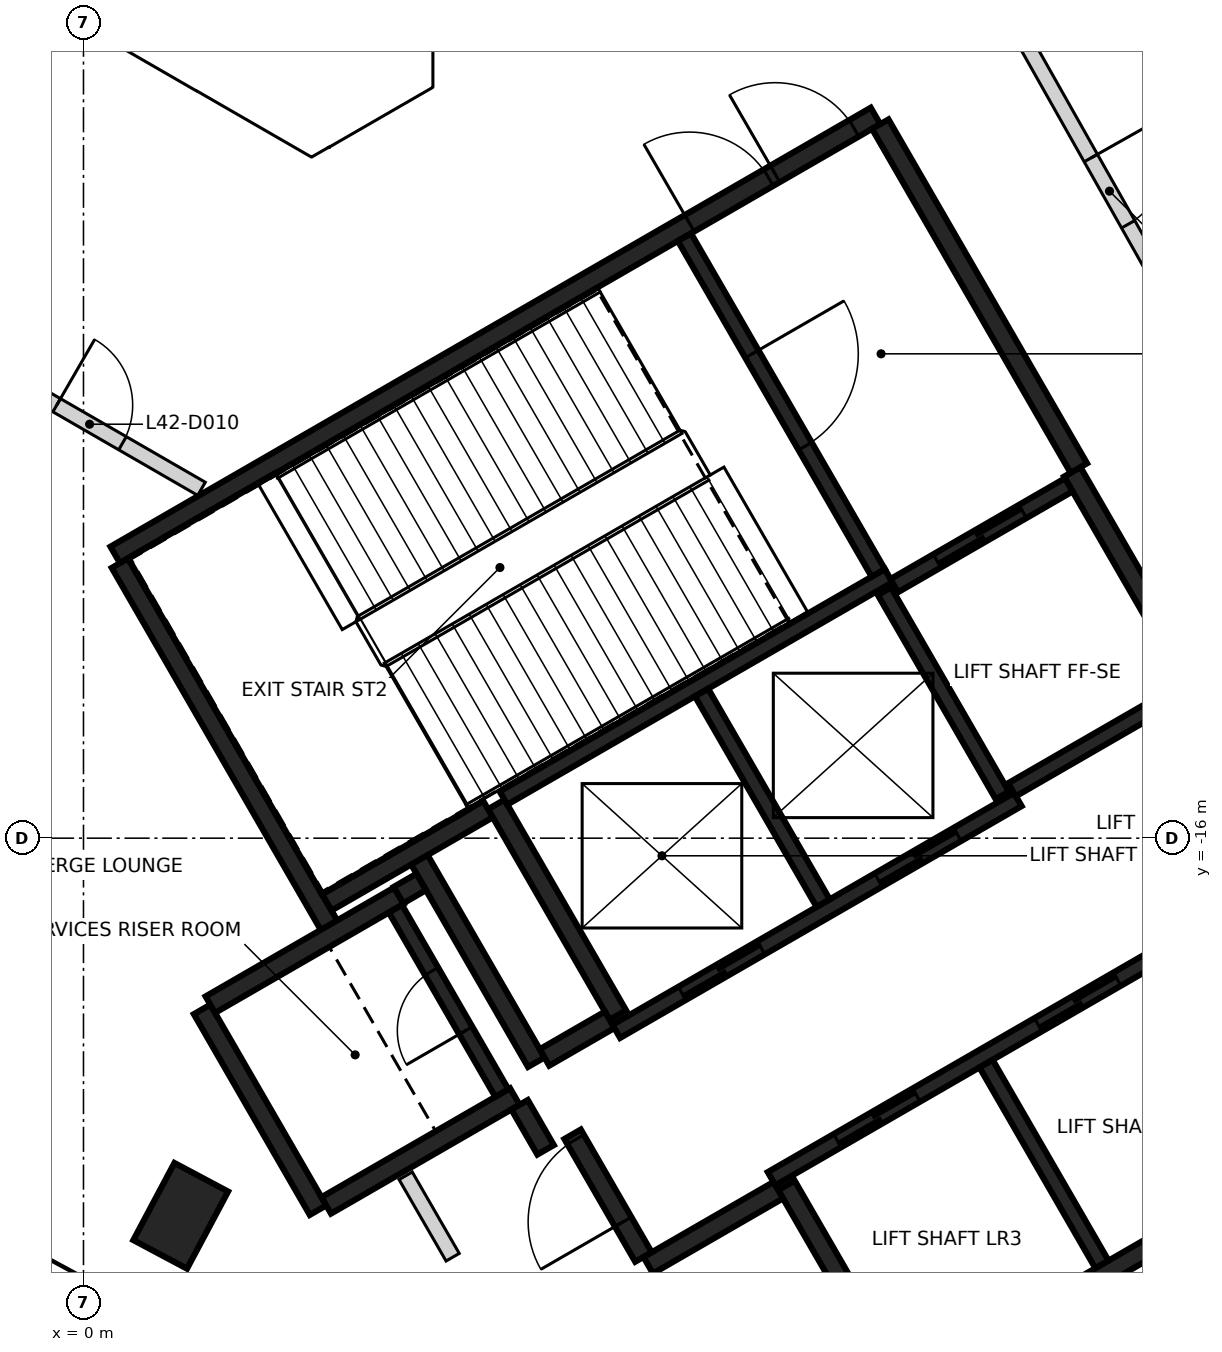
"""IFC4 building model, lengths in metres.
Left out: names, types, materials, properties, quantities, classifications, styles, units other than length and angle.
Written with IfcOpenShell. Run it as: python <this file> out.ifc"""

import sys

from ifc_helpers import new_model, si_unit, direction, frame, frame_2d, origin, origin_2d, place, context, subcontext, project, spatial, rectangle, extrude, element, fill, save


model = new_model("IFC4")
c1 = context("Model", 3, precision=1e-05, world=origin(), true_north=direction((0.0, 1.0)))
c2 = subcontext(c1, "Body", "Model", "MODEL_VIEW")
j1 = project(units=[si_unit("LENGTHUNIT", "METRE"), si_unit("PLANEANGLEUNIT", "RADIAN")], contexts=[c1])
p1 = place(None, origin())
s1 = spatial("IfcSite", under=j1, at=p1, CompositionType="ELEMENT")
p2 = place(p1, origin())
s2 = spatial("IfcBuilding", under=s1, at=p2, CompositionType="ELEMENT")
p3 = place(p2, frame((0.0, 0.0, 169.6)))
s3 = spatial("IfcBuildingStorey", under=s2, at=p3, CompositionType="ELEMENT", Elevation=169.6)
p4 = place(p3, frame((1.279, -20.968, -0.35), z_axis=(0.0, 0.0, 1.0), x_axis=(0.470001593924, 0.882665566174, 0.0)))
e1 = element("IfcColumn", 1, at=p4, inside=s3, PredefinedType="COLUMN", context=c2, shape_type="SweptSolid", body=[
    extrude(rectangle(XDim=1.15, YDim=0.8, at=origin_2d()), origin(), (0.0, 0.0, 1.0), 6.0),
])
p5 = place(p3, frame((0.417, -12.273, 0.0), z_axis=(0.0, 0.0, 1.0), x_axis=(0.866021906294, 0.500006057782, 0.0)))
e2 = element("IfcWall", 2, at=p5, inside=s3, PredefinedType="SHEAR", context=c2, shape_type="SweptSolid", body=[
    extrude(rectangle(XDim=11.55, YDim=0.25, at=frame_2d((5.775, 0.0))), origin(), (0.0, 0.0, 1.0), 5.65),
])
p6 = place(p5, frame((10.025, 0.0, 0.0)))
e3 = element("IfcOpeningElement", 3, at=p6, cuts=e2, PredefinedType="OPENING", context=c2, shape_type="SweptSolid", body=[
    extrude(rectangle(XDim=1.2, YDim=2.1, at=frame_2d((0.6, 1.05))), frame((0.0, 0.135, 0.0), z_axis=(0.0, -1.0, 0.0), x_axis=(1.0, 0.0, 0.0)), (0.0, 0.0, 1.0), 0.27),
])
p7 = place(p5, frame((8.725, 0.0, 0.0)))
e4 = element("IfcOpeningElement", 4, at=p7, cuts=e2, PredefinedType="OPENING", context=c2, shape_type="SweptSolid", body=[
    extrude(rectangle(XDim=1.2, YDim=2.1, at=frame_2d((0.6, 1.05))), frame((0.0, 0.135, 0.0), z_axis=(0.0, -1.0, 0.0), x_axis=(1.0, 0.0, 0.0)), (0.0, 0.0, 1.0), 0.27),
])
p8 = place(p3, frame((13.008, -11.181, 0.0), z_axis=(0.0, 0.0, 1.0), x_axis=(0.500004234368, -0.866022959057, 0.0)))
e5 = element("IfcWall", 5, at=p8, inside=s3, PredefinedType="SHEAR", context=c2, shape_type="SweptSolid", body=[
    extrude(rectangle(XDim=6.25, YDim=0.25, at=frame_2d((3.125, 0.0))), origin(), (0.0, 0.0, 1.0), 5.65),
])
p9 = place(p3, frame((15.865, -20.328, 0.0), z_axis=(0.0, 0.0, 1.0), x_axis=(-0.86602852612, -0.499994591916, 0.0)))
e6 = element("IfcWall", 6, at=p9, inside=s3, PredefinedType="SHEAR", context=c2, shape_type="SweptSolid", body=[
    extrude(rectangle(XDim=5.85, YDim=0.25, at=frame_2d((2.925, 0.0))), origin(), (0.0, 0.0, 1.0), 5.65),
])
p10 = place(p3, frame((3.235, -17.153, 0.0), z_axis=(0.0, 0.0, 1.0), x_axis=(-0.500008851346, 0.866020293397, 0.0)))
e7 = element("IfcWall", 7, at=p10, inside=s3, PredefinedType="SHEAR", context=c2, shape_type="SweptSolid", body=[
    extrude(rectangle(XDim=5.51, YDim=0.25, at=frame_2d((2.755, 0.0))), origin(), (0.0, 0.0, 1.0), 5.65),
])
p11 = place(p3, frame((10.483, -6.606, 0.0), z_axis=(0.0, 0.0, 1.0), x_axis=(0.49999885962, -0.866026062182, 0.0)))
e8 = element("IfcWall", 8, at=p11, inside=s3, PredefinedType="SHEAR", context=c2, shape_type="SweptSolid", body=[
    extrude(rectangle(XDim=5.225, YDim=0.25, at=frame_2d((2.612, 0.0))), origin(), (0.0, 0.0, 1.0), 5.65),
])
p12 = place(p3, frame((7.031, -18.327, 0.0), z_axis=(0.0, 0.0, 1.0), x_axis=(-0.499971222258, 0.866042017984, 0.0)))
e9 = element("IfcWall", 9, at=p12, inside=s3, PredefinedType="SHEAR", context=c2, shape_type="SweptSolid", body=[
    extrude(rectangle(XDim=3.2, YDim=0.25, at=frame_2d((1.6, 0.0))), origin(), (0.0, 0.0, 1.0), 5.65),
])
p13 = place(p3, frame((10.736, -23.145, 0.0), z_axis=(0.0, 0.0, 1.0), x_axis=(-0.500023226632, 0.866011993467, 0.0)))
e10 = element("IfcWall", 10, at=p13, inside=s3, PredefinedType="SHEAR", context=c2, shape_type="SweptSolid", body=[
    extrude(rectangle(XDim=2.974, YDim=0.25, at=frame_2d((1.487, 0.0))), origin(), (0.0, 0.0, 1.0), 5.65),
])
p14 = place(p3, frame((3.085, -20.894, 0.0), z_axis=(0.0, 0.0, 1.0), x_axis=(-0.499978833458, 0.866037623948, 0.0)))
e11 = element("IfcWall", 11, at=p14, inside=s3, PredefinedType="SHEAR", context=c2, shape_type="SweptSolid", body=[
    extrude(rectangle(XDim=3.05, YDim=0.25, at=frame_2d((1.525, 0.0))), origin(), (0.0, 0.0, 1.0), 5.65),
])
p15 = place(p3, frame((1.669, -18.19, 0.0), z_axis=(0.0, 0.0, 1.0), x_axis=(0.866042235819, 0.499970844928, 0.0)))
e12 = element("IfcWall", 12, at=p15, inside=s3, PredefinedType="SHEAR", context=c2, shape_type="SweptSolid", body=[
    extrude(rectangle(XDim=2.865, YDim=0.25, at=frame_2d((1.432, 0.0))), origin(), (0.0, 0.0, 1.0), 5.65),
])
p16 = place(p3, frame((5.675, -19.399, 0.0), z_axis=(0.0, 0.0, 1.0), x_axis=(-0.866026637627, -0.499997862916, 0.0)))
e13 = element("IfcWall", 13, at=p16, inside=s3, PredefinedType="SHEAR", context=c2, shape_type="SweptSolid", body=[
    extrude(rectangle(XDim=2.865, YDim=0.25, at=frame_2d((1.432, 0.0))), origin(), (0.0, 0.0, 1.0), 5.65),
])
p17 = place(p3, frame((4.414, -16.276, 0.0), z_axis=(0.0, 0.0, 1.0), x_axis=(0.500003324108, -0.866023484601, 0.0)))
e14 = element("IfcWall", 14, at=p17, inside=s3, PredefinedType="SHEAR", context=c2, shape_type="SweptSolid", body=[
    extrude(rectangle(XDim=3.085, YDim=0.25, at=frame_2d((1.542, 0.0))), origin(), (0.0, 0.0, 1.0), 5.65),
])
p18 = place(p3, frame((5.322, -15.619, 0.0), z_axis=(0.0, 0.0, 1.0), x_axis=(-0.866026229868, -0.499998569178, 0.0)))
e15 = element("IfcWall", 15, at=p18, inside=s3, PredefinedType="SHEAR", context=c2, shape_type="SweptSolid", body=[
    extrude(rectangle(XDim=2.449, YDim=0.25, at=frame_2d((1.225, 0.0))), origin(), (0.0, 0.0, 1.0), 5.65),
])
p19 = place(p3, frame((9.14, -20.631, 0.0), z_axis=(0.0, 0.0, 1.0), x_axis=(-0.866043531843, -0.499968599967, 0.0)))
e16 = element("IfcWall", 16, at=p19, inside=s3, PredefinedType="SHEAR", context=c2, shape_type="SweptSolid", body=[
    extrude(rectangle(XDim=1.975, YDim=0.25, at=frame_2d((0.987, 0.0))), origin(), (0.0, 0.0, 1.0), 5.65),
])
p20 = place(p3, frame((7.367, -21.51, 0.0), z_axis=(0.0, 0.0, 1.0), x_axis=(-0.499983108224, 0.866035156036, 0.0)))
e17 = element("IfcWall", 17, at=p20, inside=s3, PredefinedType="SHEAR", context=c2, shape_type="SweptSolid", body=[
    extrude(rectangle(XDim=1.865, YDim=0.25, at=frame_2d((0.932, 0.0))), origin(), (0.0, 0.0, 1.0), 5.65),
])
p21 = place(p20, frame((0.535, 0.0, 0.0)))
e18 = element("IfcOpeningElement", 18, at=p21, cuts=e17, PredefinedType="OPENING", context=c2, shape_type="SweptSolid", body=[
    extrude(rectangle(XDim=1.25, YDim=2.1, at=frame_2d((0.625, 1.05))), frame((0.0, 0.135, 0.0), z_axis=(0.0, -1.0, 0.0), x_axis=(1.0, 0.0, 0.0)), (0.0, 0.0, 1.0), 0.27),
])
p22 = place(p3, frame((6.065, -18.885, 0.0), z_axis=(0.0, 0.0, 1.0), x_axis=(0.866017078145, 0.500014420154, 0.0)))
e19 = element("IfcWall", 19, at=p22, inside=s3, PredefinedType="SHEAR", context=c2, shape_type="SweptSolid", body=[
    extrude(rectangle(XDim=0.989, YDim=0.25, at=frame_2d((0.495, 0.0))), origin(), (0.0, 0.0, 1.0), 5.65),
])
p23 = place(p3, frame((6.08, -20.1, 0.0), z_axis=(0.0, 0.0, 1.0), x_axis=(-0.500051773299, 0.865995510393, 0.0)))
e20 = element("IfcWall", 20, at=p23, inside=s3, PredefinedType="SHEAR", context=c2, shape_type="SweptSolid", body=[
    extrude(rectangle(XDim=0.685, YDim=0.25, at=frame_2d((0.342, 0.0))), origin(), (0.0, 0.0, 1.0), 5.65),
])
p24 = place(p3, frame((4.145, -16.749, 0.0), z_axis=(0.0, 0.0, 1.0), x_axis=(0.866185586049, 0.49972245349, 0.0)))
e21 = element("IfcWall", 21, at=p24, inside=s3, PredefinedType="SHEAR", context=c2, shape_type="SweptSolid", body=[
    extrude(rectangle(XDim=0.344, YDim=0.25, at=frame_2d((0.172, 0.0))), origin(), (0.0, 0.0, 1.0), 5.65),
])
p25 = place(p3, frame((9.052, -20.48, 0.0), z_axis=(0.0, 0.0, 1.0), x_axis=(0.866030299012, 0.499991521122, 0.0)))
e22 = element("IfcWall", 22, at=p25, inside=s3, PredefinedType="SHEAR", context=c2, shape_type="SweptSolid", body=[
    extrude(rectangle(XDim=6.1, YDim=0.2, at=frame_2d((3.05, 0.0))), origin(), (0.0, 0.0, 1.0), 5.65),
])
p26 = place(p25, frame((1.0, 0.0, 0.0)))
e23 = element("IfcOpeningElement", 23, at=p26, cuts=e22, PredefinedType="OPENING", context=c2, shape_type="SweptSolid", body=[
    extrude(rectangle(XDim=1.2, YDim=2.1, at=frame_2d((0.6, 1.05))), frame((0.0, 0.11, 0.0), z_axis=(0.0, -1.0, 0.0), x_axis=(1.0, 0.0, 0.0)), (0.0, 0.0, 1.0), 0.22),
])
p27 = place(p25, frame((4.05, 0.0, 0.0)))
e24 = element("IfcOpeningElement", 24, at=p27, cuts=e22, PredefinedType="OPENING", context=c2, shape_type="SweptSolid", body=[
    extrude(rectangle(XDim=1.2, YDim=2.1, at=frame_2d((0.6, 1.05))), frame((0.0, 0.11, 0.0), z_axis=(0.0, -1.0, 0.0), x_axis=(1.0, 0.0, 0.0)), (0.0, 0.0, 1.0), 0.22),
])
p28 = place(p3, frame((5.526, -15.472, 0.0), z_axis=(0.0, 0.0, 1.0), x_axis=(0.866041752167, 0.499971682701, 0.0)))
e25 = element("IfcWall", 25, at=p28, inside=s3, PredefinedType="SHEAR", context=c2, shape_type="SweptSolid", body=[
    extrude(rectangle(XDim=5.851, YDim=0.2, at=frame_2d((2.925, 0.0))), origin(), (0.0, 0.0, 1.0), 5.65),
])
p29 = place(p3, frame((12.293, -15.491, 0.0), z_axis=(0.0, 0.0, 1.0), x_axis=(-0.866030299012, -0.499991521122, 0.0)))
e26 = element("IfcWall", 26, at=p29, inside=s3, PredefinedType="SHEAR", context=c2, shape_type="SweptSolid", body=[
    extrude(rectangle(XDim=6.1, YDim=0.2, at=frame_2d((3.05, 0.0))), origin(), (0.0, 0.0, 1.0), 5.65),
])
p30 = place(p29, frame((3.9, 0.0, 0.0)))
e27 = element("IfcOpeningElement", 27, at=p30, cuts=e26, PredefinedType="OPENING", context=c2, shape_type="SweptSolid", body=[
    extrude(rectangle(XDim=1.2, YDim=2.1, at=frame_2d((0.6, 1.05))), frame((0.0, 0.11, 0.0), z_axis=(0.0, -1.0, 0.0), x_axis=(1.0, 0.0, 0.0)), (0.0, 0.0, 1.0), 0.22),
])
p31 = place(p29, frame((0.918, 0.0, 0.0)))
e28 = element("IfcOpeningElement", 28, at=p31, cuts=e26, PredefinedType="OPENING", context=c2, shape_type="SweptSolid", body=[
    extrude(rectangle(XDim=1.2, YDim=2.1, at=frame_2d((0.6, 1.05))), frame((0.0, 0.11, 0.0), z_axis=(0.0, -1.0, 0.0), x_axis=(1.0, 0.0, 0.0)), (0.0, 0.0, 1.0), 0.22),
])
p32 = place(p3, frame((7.906, -8.094, 0.0), z_axis=(0.0, 0.0, 1.0), x_axis=(0.500027839223, -0.866009330205, 0.0)))
e29 = element("IfcWall", 29, at=p32, inside=s3, PredefinedType="SHEAR", context=c2, shape_type="SweptSolid", body=[
    extrude(rectangle(XDim=5.098, YDim=0.2, at=frame_2d((2.549, 0.0))), origin(), (0.0, 0.0, 1.0), 5.65),
])
p33 = place(p32, frame((1.774, 0.0, 0.0)))
e30 = element("IfcOpeningElement", 30, at=p33, cuts=e29, PredefinedType="OPENING", context=c2, shape_type="SweptSolid", body=[
    extrude(rectangle(XDim=1.4, YDim=2.1, at=frame_2d((0.7, 1.05))), frame((0.0, 0.11, 0.0), z_axis=(0.0, -1.0, 0.0), x_axis=(1.0, 0.0, 0.0)), (0.0, 0.0, 1.0), 0.22),
])
p34 = place(p3, frame((8.132, -14.084, 0.0), z_axis=(0.0, 0.0, 1.0), x_axis=(0.499997778408, -0.866026686418, 0.0)))
e31 = element("IfcWall", 31, at=p34, inside=s3, PredefinedType="SHEAR", context=c2, shape_type="SweptSolid", body=[
    extrude(rectangle(XDim=3.198, YDim=0.2, at=frame_2d((1.599, 0.0))), origin(), (0.0, 0.0, 1.0), 5.65),
])
p35 = place(p3, frame((11.875, -18.967, 0.0), z_axis=(0.0, 0.0, 1.0), x_axis=(0.49998131003, -0.866036194175, 0.0)))
e32 = element("IfcWall", 32, at=p35, inside=s3, PredefinedType="SHEAR", context=c2, shape_type="SweptSolid", body=[
    extrude(rectangle(XDim=3.048, YDim=0.2, at=frame_2d((1.524, 0.0))), origin(), (0.0, 0.0, 1.0), 5.65),
])
p36 = place(p3, frame((5.503, -19.352, 0.0), z_axis=(0.0, 0.0, 1.0), x_axis=(-0.499986818241, 0.866033014143, 0.0)))
e33 = element("IfcWall", 33, at=p36, inside=s3, PredefinedType="SHEAR", context=c2, shape_type="SweptSolid", body=[
    extrude(rectangle(XDim=2.798, YDim=0.2, at=frame_2d((1.399, 0.0))), origin(), (0.0, 0.0, 1.0), 5.65),
])
p37 = place(p36, frame((0.949, 0.0, 0.0)))
e34 = element("IfcOpeningElement", 34, at=p37, cuts=e33, PredefinedType="OPENING", context=c2, shape_type="SweptSolid", body=[
    extrude(rectangle(XDim=0.9, YDim=2.1, at=frame_2d((0.45, 1.05))), frame((0.0, 0.11, 0.0), z_axis=(0.0, -1.0, 0.0), x_axis=(1.0, 0.0, 0.0)), (0.0, 0.0, 1.0), 0.22),
])
p38 = place(p3, frame((12.088, -15.437, 0.0), z_axis=(0.0, 0.0, 1.0), x_axis=(-0.500026960575, 0.86600983753, 0.0)))
e35 = element("IfcWall", 35, at=p38, inside=s3, PredefinedType="SHEAR", context=c2, shape_type="SweptSolid", body=[
    extrude(rectangle(XDim=3.1, YDim=0.2, at=frame_2d((1.55, 0.0))), origin(), (0.0, 0.0, 1.0), 5.65),
])
p39 = place(p3, frame((10.666, -12.678, 0.0), z_axis=(0.0, 0.0, 1.0), x_axis=(0.866018407898, 0.500012117035, 0.0)))
e36 = element("IfcWall", 36, at=p39, inside=s3, PredefinedType="SHEAR", context=c2, shape_type="SweptSolid", body=[
    extrude(rectangle(XDim=2.651, YDim=0.2, at=frame_2d((1.325, 0.0))), origin(), (0.0, 0.0, 1.0), 5.65),
])
p40 = place(p39, frame((0.652, 0.0, 0.0)))
e37 = element("IfcOpeningElement", 37, at=p40, cuts=e36, PredefinedType="OPENING", context=c2, shape_type="SweptSolid", body=[
    extrude(rectangle(XDim=1.3, YDim=2.1, at=frame_2d((0.65, 1.05))), frame((0.0, 0.11, 0.0), z_axis=(0.0, -1.0, 0.0), x_axis=(1.0, 0.0, 0.0)), (0.0, 0.0, 1.0), 0.22),
])
p41 = place(p3, frame((14.512, -14.037, 0.0), z_axis=(0.0, 0.0, 1.0), x_axis=(-0.866018407898, -0.500012117035, 0.0)))
e38 = element("IfcWall", 38, at=p41, inside=s3, PredefinedType="SHEAR", context=c2, shape_type="SweptSolid", body=[
    extrude(rectangle(XDim=2.651, YDim=0.2, at=frame_2d((1.325, 0.0))), origin(), (0.0, 0.0, 1.0), 5.65),
])
p42 = place(p3, frame((-8.337, -5.695, 0.0), z_axis=(0.0, 0.0, 1.0), x_axis=(0.86605990967, -0.499940229289, 0.0)))
e39 = element("IfcWall", 39, at=p42, inside=s3, PredefinedType="PARTITIONING", context=c2, shape_type="SweptSolid", body=[
    extrude(rectangle(XDim=11.419, YDim=0.2, at=frame_2d((5.709, 0.0))), origin(), (0.0, 0.0, 1.0), 5.65),
])
p43 = place(p42, frame((2.987, 0.0, 0.0)))
e40 = element("IfcOpeningElement", 40, at=p43, cuts=e39, PredefinedType="OPENING", context=c2, shape_type="SweptSolid", body=[
    extrude(rectangle(XDim=2.0, YDim=2.1, at=frame_2d((1.0, 1.05))), frame((0.0, 0.11, 0.0), z_axis=(0.0, -1.0, 0.0), x_axis=(1.0, 0.0, 0.0)), (0.0, 0.0, 1.0), 0.22),
])
p44 = place(p42, frame((9.219, 0.0, 0.0)))
e41 = element("IfcOpeningElement", 41, at=p44, cuts=e39, PredefinedType="OPENING", context=c2, shape_type="SweptSolid", body=[
    extrude(rectangle(XDim=1.0, YDim=2.1, at=frame_2d((0.5, 1.05))), frame((0.0, 0.11, 0.0), z_axis=(0.0, -1.0, 0.0), x_axis=(1.0, 0.0, 0.0)), (0.0, 0.0, 1.0), 0.22),
])
p45 = place(p3, frame((4.239, -20.442, 0.0), z_axis=(0.0, 0.0, 1.0), x_axis=(0.499790804427, -0.866146149221, 0.0)))
e42 = element("IfcWall", 42, at=p45, inside=s3, PredefinedType="PARTITIONING", context=c2, shape_type="SweptSolid", body=[
    extrude(rectangle(XDim=1.237, YDim=0.2, at=frame_2d((0.618, 0.0))), origin(), (0.0, 0.0, 1.0), 5.65),
])
p46 = place(p3, frame((12.187, -5.164, 0.0), z_axis=(0.0, 0.0, 1.0), x_axis=(0.491323462206, -0.870977184251, 0.0)))
e43 = element("IfcWall", 43, at=p46, inside=s3, PredefinedType="PARTITIONING", context=c2, shape_type="SweptSolid", body=[
    extrude(rectangle(XDim=12.523, YDim=0.2, at=frame_2d((6.261, 0.0))), origin(), (0.0, 0.0, 1.0), 4.75),
])
p47 = place(p46, frame((9.546, 0.0, 0.0)))
e44 = element("IfcOpeningElement", 44, at=p47, cuts=e43, PredefinedType="OPENING", context=c2, shape_type="SweptSolid", body=[
    extrude(rectangle(XDim=0.9, YDim=2.1, at=frame_2d((0.45, 1.05))), frame((0.0, 0.11, 0.0), z_axis=(0.0, -1.0, 0.0), x_axis=(1.0, 0.0, 0.0)), (0.0, 0.0, 1.0), 0.22),
])
p48 = place(p46, frame((2.168, 0.0, 0.0)))
e45 = element("IfcOpeningElement", 45, at=p48, cuts=e43, PredefinedType="OPENING", context=c2, shape_type="SweptSolid", body=[
    extrude(rectangle(XDim=1.0, YDim=2.1, at=frame_2d((0.5, 1.05))), frame((0.0, 0.11, 0.0), z_axis=(0.0, -1.0, 0.0), x_axis=(1.0, 0.0, 0.0)), (0.0, 0.0, 1.0), 0.22),
])
p49 = place(p40, origin())
e46 = element("IfcDoor", 46, at=p49, inside=s3, OperationType="SLIDING_TO_RIGHT", PredefinedType="DOOR", context=c2, shape_type="SweptSolid", body=[
    extrude(rectangle(XDim=1.3, YDim=2.1, at=frame_2d((0.65, 1.05))), frame((0.0, 0.025, 0.0), z_axis=(0.0, -1.0, 0.0), x_axis=(1.0, 0.0, 0.0)), (0.0, 0.0, 1.0), 0.05),
])
fill(e37, e46)
p50 = place(p30, origin())
e47 = element("IfcDoor", 47, at=p50, inside=s3, OperationType="DOUBLE_DOOR_SLIDING", PredefinedType="DOOR", context=c2, shape_type="SweptSolid", body=[
    extrude(rectangle(XDim=1.2, YDim=2.1, at=frame_2d((0.6, 1.05))), frame((0.0, 0.025, 0.0), z_axis=(0.0, -1.0, 0.0), x_axis=(1.0, 0.0, 0.0)), (0.0, 0.0, 1.0), 0.05),
])
fill(e27, e47)
p51 = place(p31, origin())
e48 = element("IfcDoor", 48, at=p51, inside=s3, OperationType="DOUBLE_DOOR_SLIDING", PredefinedType="DOOR", context=c2, shape_type="SweptSolid", body=[
    extrude(rectangle(XDim=1.2, YDim=2.1, at=frame_2d((0.6, 1.05))), frame((0.0, 0.025, 0.0), z_axis=(0.0, -1.0, 0.0), x_axis=(1.0, 0.0, 0.0)), (0.0, 0.0, 1.0), 0.05),
])
fill(e28, e48)
p52 = place(p26, origin())
e49 = element("IfcDoor", 49, at=p52, inside=s3, OperationType="DOUBLE_DOOR_SLIDING", PredefinedType="DOOR", context=c2, shape_type="SweptSolid", body=[
    extrude(rectangle(XDim=1.2, YDim=2.1, at=frame_2d((0.6, 1.05))), frame((0.0, 0.025, 0.0), z_axis=(0.0, -1.0, 0.0), x_axis=(1.0, 0.0, 0.0)), (0.0, 0.0, 1.0), 0.05),
])
fill(e23, e49)
p53 = place(p27, origin())
e50 = element("IfcDoor", 50, at=p53, inside=s3, OperationType="DOUBLE_DOOR_SLIDING", PredefinedType="DOOR", context=c2, shape_type="SweptSolid", body=[
    extrude(rectangle(XDim=1.2, YDim=2.1, at=frame_2d((0.6, 1.05))), frame((0.0, 0.025, 0.0), z_axis=(0.0, -1.0, 0.0), x_axis=(1.0, 0.0, 0.0)), (0.0, 0.0, 1.0), 0.05),
])
fill(e24, e50)
p54 = place(p21, origin())
e51 = element("IfcDoor", 51, at=p54, inside=s3, OperationType="SINGLE_SWING_LEFT", PredefinedType="DOOR", context=c2, shape_type="SweptSolid", body=[
    extrude(rectangle(XDim=1.25, YDim=2.1, at=frame_2d((0.625, 1.05))), frame((0.0, 0.025, 0.0), z_axis=(0.0, -1.0, 0.0), x_axis=(1.0, 0.0, 0.0)), (0.0, 0.0, 1.0), 0.05),
])
fill(e18, e51)
p55 = place(p6, origin())
e52 = element("IfcDoor", 52, at=p55, inside=s3, OperationType="SINGLE_SWING_LEFT", PredefinedType="DOOR", context=c2, shape_type="SweptSolid", body=[
    extrude(rectangle(XDim=1.2, YDim=2.1, at=frame_2d((0.6, 1.05))), frame((0.0, 0.025, 0.0), z_axis=(0.0, -1.0, 0.0), x_axis=(1.0, 0.0, 0.0)), (0.0, 0.0, 1.0), 0.05),
])
fill(e3, e52)
p56 = place(p7, origin())
e53 = element("IfcDoor", 53, at=p56, inside=s3, OperationType="SINGLE_SWING_RIGHT", PredefinedType="DOOR", context=c2, shape_type="SweptSolid", body=[
    extrude(rectangle(XDim=1.2, YDim=2.1, at=frame_2d((0.6, 1.05))), frame((0.0, 0.025, 0.0), z_axis=(0.0, -1.0, 0.0), x_axis=(1.0, 0.0, 0.0)), (0.0, 0.0, 1.0), 0.05),
])
fill(e4, e53)
p57 = place(p33, origin())
e54 = element("IfcDoor", 54, at=p57, inside=s3, OperationType="SINGLE_SWING_RIGHT", PredefinedType="DOOR", context=c2, shape_type="SweptSolid", body=[
    extrude(rectangle(XDim=1.4, YDim=2.1, at=frame_2d((0.7, 1.05))), frame((0.0, 0.025, 0.0), z_axis=(0.0, -1.0, 0.0), x_axis=(1.0, 0.0, 0.0)), (0.0, 0.0, 1.0), 0.05),
])
fill(e30, e54)
p58 = place(p37, origin())
e55 = element("IfcDoor", 55, at=p58, inside=s3, OperationType="SINGLE_SWING_LEFT", PredefinedType="DOOR", context=c2, shape_type="SweptSolid", body=[
    extrude(rectangle(XDim=0.9, YDim=2.1, at=frame_2d((0.45, 1.05))), frame((0.0, 0.025, 0.0), z_axis=(0.0, -1.0, 0.0), x_axis=(1.0, 0.0, 0.0)), (0.0, 0.0, 1.0), 0.05),
])
fill(e34, e55)
p59 = place(p44, frame((1.0, 0.0, 0.0), z_axis=(0.0, 0.0, 1.0), x_axis=(-1.0, 0.0, 0.0)))
e56 = element("IfcDoor", 56, at=p59, inside=s3, OperationType="SINGLE_SWING_LEFT", PredefinedType="DOOR", context=c2, shape_type="SweptSolid", body=[
    extrude(rectangle(XDim=1.0, YDim=2.1, at=frame_2d((0.5, 1.05))), frame((0.0, 0.025, 0.0), z_axis=(0.0, -1.0, 0.0), x_axis=(1.0, 0.0, 0.0)), (0.0, 0.0, 1.0), 0.05),
])
fill(e41, e56)
p60 = place(p48, origin())
e57 = element("IfcDoor", 57, at=p60, inside=s3, OperationType="SINGLE_SWING_LEFT", PredefinedType="DOOR", context=c2, shape_type="SweptSolid", body=[
    extrude(rectangle(XDim=1.0, YDim=2.1, at=frame_2d((0.5, 1.05))), frame((0.0, 0.025, 0.0), z_axis=(0.0, -1.0, 0.0), x_axis=(1.0, 0.0, 0.0)), (0.0, 0.0, 1.0), 0.05),
])
fill(e45, e57)
save(model, sys.argv[1])
